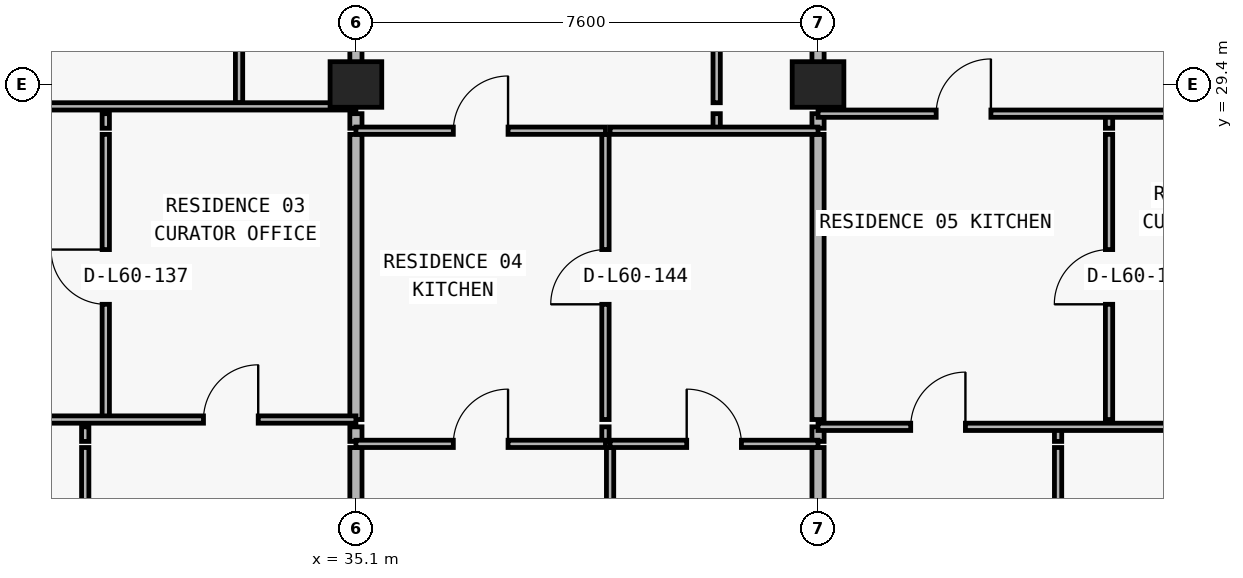
"""IFC4 building model, lengths in metres.
Left out: names, types, materials, properties, quantities, classifications, styles, units other than length and angle.
Written with IfcOpenShell. Run it as: python <this file> out.ifc"""

import sys

from ifc_helpers import new_model, si_unit, direction, frame, frame_2d, origin, origin_2d, place, context, subcontext, project, spatial, rectangle, extrude, element, fill, save


model = new_model("IFC4")
c1 = context("Model", 3, precision=1e-05, world=origin(), true_north=direction((0.0, 1.0)))
c2 = subcontext(c1, "Body", "Model", "MODEL_VIEW")
j1 = project(units=[si_unit("LENGTHUNIT", "METRE"), si_unit("PLANEANGLEUNIT", "RADIAN")], contexts=[c1])
p1 = place(None, origin())
s1 = spatial("IfcSite", under=j1, at=p1, CompositionType="ELEMENT")
p2 = place(p1, origin())
s2 = spatial("IfcBuilding", under=s1, at=p2, CompositionType="ELEMENT")
p3 = place(p2, frame((0.0, 0.0, 214.8)))
s3 = spatial("IfcBuildingStorey", under=s2, at=p3, CompositionType="ELEMENT", Elevation=214.8)
for number, where, z_axis, x_axis in (
    (1, (35.1, 29.4, 0.0), (0.0, 0.0, 1.0), (1.0, 0.0, 0.0)),
    (2, (42.7, 29.4, 0.0), (0.0, 0.0, 1.0), (1.0, 0.0, 0.0)),
):
    element("IfcColumn", number, at=place(p3, frame(where, z_axis=z_axis, x_axis=x_axis)), inside=s3, PredefinedType="COLUMN", context=c2, shape_type="SweptSolid", body=[
        extrude(rectangle(XDim=0.85, YDim=0.75, at=origin_2d()), origin(), (0.0, 0.0, 1.0), 3.05),
    ])
p4 = place(p3, frame((30.648, 11.24, 0.0), z_axis=(0.0, 0.0, 1.0), x_axis=(0.0, 1.0, 0.0)))
e3 = element("IfcWall", 3, at=p4, inside=s3, PredefinedType="PARTITIONING", context=c2, shape_type="SweptSolid", body=[
    extrude(rectangle(XDim=12.19, YDim=0.12, at=frame_2d((6.095, 0.0))), origin(), (0.0, 0.0, 1.0), 3.05),
])
p5 = place(p3, frame((30.648, 23.53, 0.0), z_axis=(0.0, 0.0, 1.0), x_axis=(0.0, 1.0, 0.0)))
e4 = element("IfcWall", 4, at=p5, inside=s3, PredefinedType="PARTITIONING", context=c2, shape_type="SweptSolid", body=[
    extrude(rectangle(XDim=0.24, YDim=0.12, at=frame_2d((0.12, 0.0))), origin(), (0.0, 0.0, 1.0), 3.05),
])
p6 = place(p3, frame((30.986, 23.89, 0.0), z_axis=(0.0, 0.0, 1.0), x_axis=(0.0, 1.0, 0.0)))
e5 = element("IfcWall", 5, at=p6, inside=s3, PredefinedType="PARTITIONING", context=c2, shape_type="SweptSolid", body=[
    extrude(rectangle(XDim=4.69, YDim=0.12, at=frame_2d((2.345, 0.0))), origin(), (0.0, 0.0, 1.0), 3.05),
])
p7 = place(p6, frame((1.895, 0.0, 0.0)))
e6 = element("IfcOpeningElement", 6, at=p7, cuts=e5, PredefinedType="OPENING", context=c2, shape_type="SweptSolid", body=[
    extrude(rectangle(XDim=0.9, YDim=2.15, at=frame_2d((0.45, 1.075))), frame((0.0, 0.07, 0.0), z_axis=(0.0, -1.0, 0.0), x_axis=(1.0, 0.0, 0.0)), (0.0, 0.0, 1.0), 0.14),
])
p8 = place(p3, frame((30.986, 28.68, 0.0), z_axis=(0.0, 0.0, 1.0), x_axis=(0.0, 1.0, 0.0)))
e7 = element("IfcWall", 7, at=p8, inside=s3, PredefinedType="PARTITIONING", context=c2, shape_type="SweptSolid", body=[
    extrude(rectangle(XDim=0.24, YDim=0.12, at=frame_2d((0.12, 0.0))), origin(), (0.0, 0.0, 1.0), 3.05),
])
p9 = place(p3, frame((33.178, 29.1, 0.0), z_axis=(0.0, 0.0, 1.0), x_axis=(0.0, 1.0, 0.0)))
e8 = element("IfcWall", 8, at=p9, inside=s3, PredefinedType="PARTITIONING", context=c2, shape_type="SweptSolid", body=[
    extrude(rectangle(XDim=5.3, YDim=0.12, at=frame_2d((2.65, 0.0))), origin(), (0.0, 0.0, 1.0), 3.05),
])
p10 = place(p9, frame((2.225, 0.0, 0.0)))
e9 = element("IfcOpeningElement", 9, at=p10, cuts=e8, PredefinedType="OPENING", context=c2, shape_type="SweptSolid", body=[
    extrude(rectangle(XDim=0.85, YDim=2.1, at=frame_2d((0.425, 1.05))), frame((0.0, 0.07, 0.0), z_axis=(0.0, -1.0, 0.0), x_axis=(1.0, 0.0, 0.0)), (0.0, 0.0, 1.0), 0.14),
])
p11 = place(p3, frame((35.1, 11.24, 0.0), z_axis=(0.0, 0.0, 1.0), x_axis=(0.0, 1.0, 0.0)))
e10 = element("IfcWall", 10, at=p11, inside=s3, PredefinedType="PARTITIONING", context=c2, shape_type="SweptSolid", body=[
    extrude(rectangle(XDim=12.19, YDim=0.2, at=frame_2d((6.095, 0.0))), origin(), (0.0, 0.0, 1.0), 2.263),
])
p12 = place(p3, frame((35.1, 23.53, 0.0), z_axis=(0.0, 0.0, 1.0), x_axis=(0.0, 1.0, 0.0)))
e11 = element("IfcWall", 11, at=p12, inside=s3, PredefinedType="PARTITIONING", context=c2, shape_type="SweptSolid", body=[
    extrude(rectangle(XDim=0.24, YDim=0.2, at=frame_2d((0.12, 0.0))), origin(), (0.0, 0.0, 1.0), 2.263),
])
p13 = place(p3, frame((35.1, 23.89, 0.0), z_axis=(0.0, 0.0, 1.0), x_axis=(0.0, 1.0, 0.0)))
e12 = element("IfcWall", 12, at=p13, inside=s3, PredefinedType="PARTITIONING", context=c2, shape_type="SweptSolid", body=[
    extrude(rectangle(XDim=4.69, YDim=0.2, at=frame_2d((2.345, 0.0))), origin(), (0.0, 0.0, 1.0), 2.263),
])
p14 = place(p3, frame((35.1, 28.68, 0.0), z_axis=(0.0, 0.0, 1.0), x_axis=(0.0, 1.0, 0.0)))
e13 = element("IfcWall", 13, at=p14, inside=s3, PredefinedType="PARTITIONING", context=c2, shape_type="SweptSolid", body=[
    extrude(rectangle(XDim=0.24, YDim=0.2, at=frame_2d((0.12, 0.0))), origin(), (0.0, 0.0, 1.0), 2.263),
])
p15 = place(p3, frame((35.1, 29.1, 0.0), z_axis=(0.0, 0.0, 1.0), x_axis=(0.0, 1.0, 0.0)))
e14 = element("IfcWall", 14, at=p15, inside=s3, PredefinedType="PARTITIONING", context=c2, shape_type="SweptSolid", body=[
    extrude(rectangle(XDim=5.3, YDim=0.2, at=frame_2d((2.65, 0.0))), origin(), (0.0, 0.0, 1.0), 2.263),
])
p16 = place(p3, frame((39.204, 23.53, 0.0), z_axis=(0.0, 0.0, 1.0), x_axis=(0.0, 1.0, 0.0)))
e15 = element("IfcWall", 15, at=p16, inside=s3, PredefinedType="PARTITIONING", context=c2, shape_type="SweptSolid", body=[
    extrude(rectangle(XDim=0.24, YDim=0.12, at=frame_2d((0.12, 0.0))), origin(), (0.0, 0.0, 1.0), 3.05),
])
p17 = place(p3, frame((39.204, 23.89, 0.0), z_axis=(0.0, 0.0, 1.0), x_axis=(0.0, 1.0, 0.0)))
e16 = element("IfcWall", 16, at=p17, inside=s3, PredefinedType="PARTITIONING", context=c2, shape_type="SweptSolid", body=[
    extrude(rectangle(XDim=4.69, YDim=0.12, at=frame_2d((2.345, 0.0))), origin(), (0.0, 0.0, 1.0), 3.05),
])
p18 = place(p17, frame((1.895, 0.0, 0.0)))
e17 = element("IfcOpeningElement", 17, at=p18, cuts=e16, PredefinedType="OPENING", context=c2, shape_type="SweptSolid", body=[
    extrude(rectangle(XDim=0.9, YDim=2.15, at=frame_2d((0.45, 1.075))), frame((0.0, 0.07, 0.0), z_axis=(0.0, -1.0, 0.0), x_axis=(1.0, 0.0, 0.0)), (0.0, 0.0, 1.0), 0.14),
])
p19 = place(p3, frame((39.28, 11.24, 0.0), z_axis=(0.0, 0.0, 1.0), x_axis=(0.0, 1.0, 0.0)))
e18 = element("IfcWall", 18, at=p19, inside=s3, PredefinedType="PARTITIONING", context=c2, shape_type="SweptSolid", body=[
    extrude(rectangle(XDim=12.19, YDim=0.12, at=frame_2d((6.095, 0.0))), origin(), (0.0, 0.0, 1.0), 3.05),
])
p20 = place(p3, frame((41.033, 28.68, 0.0), z_axis=(0.0, 0.0, 1.0), x_axis=(0.0, 1.0, 0.0)))
e19 = element("IfcWall", 19, at=p20, inside=s3, PredefinedType="PARTITIONING", context=c2, shape_type="SweptSolid", body=[
    extrude(rectangle(XDim=0.24, YDim=0.12, at=frame_2d((0.12, 0.0))), origin(), (0.0, 0.0, 1.0), 3.05),
])
p21 = place(p3, frame((41.033, 29.1, 0.0), z_axis=(0.0, 0.0, 1.0), x_axis=(0.0, 1.0, 0.0)))
e20 = element("IfcWall", 20, at=p21, inside=s3, PredefinedType="PARTITIONING", context=c2, shape_type="SweptSolid", body=[
    extrude(rectangle(XDim=5.3, YDim=0.12, at=frame_2d((2.65, 0.0))), origin(), (0.0, 0.0, 1.0), 3.05),
])
p22 = place(p21, frame((2.225, 0.0, 0.0)))
e21 = element("IfcOpeningElement", 21, at=p22, cuts=e20, PredefinedType="OPENING", context=c2, shape_type="SweptSolid", body=[
    extrude(rectangle(XDim=0.85, YDim=2.1, at=frame_2d((0.425, 1.05))), frame((0.0, 0.07, 0.0), z_axis=(0.0, -1.0, 0.0), x_axis=(1.0, 0.0, 0.0)), (0.0, 0.0, 1.0), 0.14),
])
p23 = place(p3, frame((42.7, 11.24, 0.0), z_axis=(0.0, 0.0, 1.0), x_axis=(0.0, 1.0, 0.0)))
e22 = element("IfcWall", 22, at=p23, inside=s3, PredefinedType="PARTITIONING", context=c2, shape_type="SweptSolid", body=[
    extrude(rectangle(XDim=12.19, YDim=0.2, at=frame_2d((6.095, 0.0))), origin(), (0.0, 0.0, 1.0), 2.263),
])
p24 = place(p3, frame((42.7, 23.53, 0.0), z_axis=(0.0, 0.0, 1.0), x_axis=(0.0, 1.0, 0.0)))
e23 = element("IfcWall", 23, at=p24, inside=s3, PredefinedType="PARTITIONING", context=c2, shape_type="SweptSolid", body=[
    extrude(rectangle(XDim=0.24, YDim=0.2, at=frame_2d((0.12, 0.0))), origin(), (0.0, 0.0, 1.0), 2.263),
])
p25 = place(p3, frame((42.7, 23.89, 0.0), z_axis=(0.0, 0.0, 1.0), x_axis=(0.0, 1.0, 0.0)))
e24 = element("IfcWall", 24, at=p25, inside=s3, PredefinedType="PARTITIONING", context=c2, shape_type="SweptSolid", body=[
    extrude(rectangle(XDim=4.69, YDim=0.2, at=frame_2d((2.345, 0.0))), origin(), (0.0, 0.0, 1.0), 2.263),
])
p26 = place(p3, frame((42.7, 28.68, 0.0), z_axis=(0.0, 0.0, 1.0), x_axis=(0.0, 1.0, 0.0)))
e25 = element("IfcWall", 25, at=p26, inside=s3, PredefinedType="PARTITIONING", context=c2, shape_type="SweptSolid", body=[
    extrude(rectangle(XDim=0.24, YDim=0.2, at=frame_2d((0.12, 0.0))), origin(), (0.0, 0.0, 1.0), 2.263),
])
p27 = place(p3, frame((42.7, 29.1, 0.0), z_axis=(0.0, 0.0, 1.0), x_axis=(0.0, 1.0, 0.0)))
e26 = element("IfcWall", 26, at=p27, inside=s3, PredefinedType="PARTITIONING", context=c2, shape_type="SweptSolid", body=[
    extrude(rectangle(XDim=5.3, YDim=0.2, at=frame_2d((2.65, 0.0))), origin(), (0.0, 0.0, 1.0), 2.263),
])
p28 = place(p3, frame((46.648, 11.24, 0.0), z_axis=(0.0, 0.0, 1.0), x_axis=(0.0, 1.0, 0.0)))
e27 = element("IfcWall", 27, at=p28, inside=s3, PredefinedType="PARTITIONING", context=c2, shape_type="SweptSolid", body=[
    extrude(rectangle(XDim=12.19, YDim=0.12, at=frame_2d((6.095, 0.0))), origin(), (0.0, 0.0, 1.0), 3.05),
])
p29 = place(p3, frame((46.648, 23.53, 0.0), z_axis=(0.0, 0.0, 1.0), x_axis=(0.0, 1.0, 0.0)))
e28 = element("IfcWall", 28, at=p29, inside=s3, PredefinedType="PARTITIONING", context=c2, shape_type="SweptSolid", body=[
    extrude(rectangle(XDim=0.24, YDim=0.12, at=frame_2d((0.12, 0.0))), origin(), (0.0, 0.0, 1.0), 3.05),
])
p30 = place(p3, frame((47.486, 23.89, 0.0), z_axis=(0.0, 0.0, 1.0), x_axis=(0.0, 1.0, 0.0)))
e29 = element("IfcWall", 29, at=p30, inside=s3, PredefinedType="PARTITIONING", context=c2, shape_type="SweptSolid", body=[
    extrude(rectangle(XDim=4.69, YDim=0.12, at=frame_2d((2.345, 0.0))), origin(), (0.0, 0.0, 1.0), 3.05),
])
p31 = place(p30, frame((1.895, 0.0, 0.0)))
e30 = element("IfcOpeningElement", 30, at=p31, cuts=e29, PredefinedType="OPENING", context=c2, shape_type="SweptSolid", body=[
    extrude(rectangle(XDim=0.9, YDim=2.15, at=frame_2d((0.45, 1.075))), frame((0.0, 0.07, 0.0), z_axis=(0.0, -1.0, 0.0), x_axis=(1.0, 0.0, 0.0)), (0.0, 0.0, 1.0), 0.14),
])
p32 = place(p3, frame((47.486, 28.68, 0.0), z_axis=(0.0, 0.0, 1.0), x_axis=(0.0, 1.0, 0.0)))
e31 = element("IfcWall", 31, at=p32, inside=s3, PredefinedType="PARTITIONING", context=c2, shape_type="SweptSolid", body=[
    extrude(rectangle(XDim=0.24, YDim=0.12, at=frame_2d((0.12, 0.0))), origin(), (0.0, 0.0, 1.0), 3.05),
])
p33 = place(p3, frame((35.1, 23.49, 0.0), z_axis=(0.0, 0.0, 1.0), x_axis=(1.0, 0.0, 0.0)))
e32 = element("IfcWall", 32, at=p33, inside=s3, PredefinedType="PARTITIONING", context=c2, shape_type="SweptSolid", body=[
    extrude(rectangle(XDim=4.104, YDim=0.12, at=frame_2d((2.052, 0.0))), origin(), (0.0, 0.0, 1.0), 3.05),
])
p34 = place(p33, frame((1.602, 0.0, 0.0)))
e33 = element("IfcOpeningElement", 33, at=p34, cuts=e32, PredefinedType="OPENING", context=c2, shape_type="SweptSolid", body=[
    extrude(rectangle(XDim=0.9, YDim=2.15, at=frame_2d((0.45, 1.075))), frame((0.0, 0.07, 0.0), z_axis=(0.0, -1.0, 0.0), x_axis=(1.0, 0.0, 0.0)), (0.0, 0.0, 1.0), 0.14),
])
p35 = place(p3, frame((39.28, 23.49, 0.0), z_axis=(0.0, 0.0, 1.0), x_axis=(1.0, 0.0, 0.0)))
e34 = element("IfcWall", 34, at=p35, inside=s3, PredefinedType="PARTITIONING", context=c2, shape_type="SweptSolid", body=[
    extrude(rectangle(XDim=3.42, YDim=0.12, at=frame_2d((1.71, 0.0))), origin(), (0.0, 0.0, 1.0), 3.05),
])
p36 = place(p35, frame((1.26, 0.0, 0.0)))
e35 = element("IfcOpeningElement", 35, at=p36, cuts=e34, PredefinedType="OPENING", context=c2, shape_type="SweptSolid", body=[
    extrude(rectangle(XDim=0.9, YDim=2.15, at=frame_2d((0.45, 1.075))), frame((0.0, 0.07, 0.0), z_axis=(0.0, -1.0, 0.0), x_axis=(1.0, 0.0, 0.0)), (0.0, 0.0, 1.0), 0.14),
])
p37 = place(p3, frame((42.7, 23.77, 0.0), z_axis=(0.0, 0.0, 1.0), x_axis=(1.0, 0.0, 0.0)))
e36 = element("IfcWall", 36, at=p37, inside=s3, PredefinedType="PARTITIONING", context=c2, shape_type="SweptSolid", body=[
    extrude(rectangle(XDim=8.18, YDim=0.12, at=frame_2d((4.09, 0.0))), origin(), (0.0, 0.0, 1.0), 3.05),
])
p38 = place(p37, frame((1.524, 0.0, 0.0)))
e37 = element("IfcOpeningElement", 37, at=p38, cuts=e36, PredefinedType="OPENING", context=c2, shape_type="SweptSolid", body=[
    extrude(rectangle(XDim=0.9, YDim=2.15, at=frame_2d((0.45, 1.075))), frame((0.0, 0.07, 0.0), z_axis=(0.0, -1.0, 0.0), x_axis=(1.0, 0.0, 0.0)), (0.0, 0.0, 1.0), 0.14),
])
p39 = place(p37, frame((6.033, 0.0, 0.0)))
e38 = element("IfcOpeningElement", 38, at=p39, cuts=e36, PredefinedType="OPENING", context=c2, shape_type="SweptSolid", body=[
    extrude(rectangle(XDim=0.9, YDim=2.15, at=frame_2d((0.45, 1.075))), frame((0.0, 0.07, 0.0), z_axis=(0.0, -1.0, 0.0), x_axis=(1.0, 0.0, 0.0)), (0.0, 0.0, 1.0), 0.14),
])
p40 = place(p3, frame((26.92, 23.89, 0.0), z_axis=(0.0, 0.0, 1.0), x_axis=(1.0, 0.0, 0.0)))
e39 = element("IfcWall", 39, at=p40, inside=s3, PredefinedType="PARTITIONING", context=c2, shape_type="SweptSolid", body=[
    extrude(rectangle(XDim=8.18, YDim=0.12, at=frame_2d((4.09, 0.0))), origin(), (0.0, 0.0, 1.0), 3.05),
])
p41 = place(p40, frame((1.414, 0.0, 0.0)))
e40 = element("IfcOpeningElement", 40, at=p41, cuts=e39, PredefinedType="OPENING", context=c2, shape_type="SweptSolid", body=[
    extrude(rectangle(XDim=0.9, YDim=2.15, at=frame_2d((0.45, 1.075))), frame((0.0, 0.07, 0.0), z_axis=(0.0, -1.0, 0.0), x_axis=(1.0, 0.0, 0.0)), (0.0, 0.0, 1.0), 0.14),
])
p42 = place(p40, frame((5.673, 0.0, 0.0)))
e41 = element("IfcOpeningElement", 41, at=p42, cuts=e39, PredefinedType="OPENING", context=c2, shape_type="SweptSolid", body=[
    extrude(rectangle(XDim=0.9, YDim=2.15, at=frame_2d((0.45, 1.075))), frame((0.0, 0.07, 0.0), z_axis=(0.0, -1.0, 0.0), x_axis=(1.0, 0.0, 0.0)), (0.0, 0.0, 1.0), 0.14),
])
p43 = place(p3, frame((35.1, 28.64, 0.0), z_axis=(0.0, 0.0, 1.0), x_axis=(1.0, 0.0, 0.0)))
e42 = element("IfcWall", 42, at=p43, inside=s3, PredefinedType="PARTITIONING", context=c2, shape_type="SweptSolid", body=[
    extrude(rectangle(XDim=4.104, YDim=0.12, at=frame_2d((2.052, 0.0))), origin(), (0.0, 0.0, 1.0), 3.05),
])
p44 = place(p43, frame((1.602, 0.0, 0.0)))
e43 = element("IfcOpeningElement", 43, at=p44, cuts=e42, PredefinedType="OPENING", context=c2, shape_type="SweptSolid", body=[
    extrude(rectangle(XDim=0.9, YDim=2.15, at=frame_2d((0.45, 1.075))), frame((0.0, 0.07, 0.0), z_axis=(0.0, -1.0, 0.0), x_axis=(1.0, 0.0, 0.0)), (0.0, 0.0, 1.0), 0.14),
])
p45 = place(p3, frame((39.28, 28.64, 0.0), z_axis=(0.0, 0.0, 1.0), x_axis=(1.0, 0.0, 0.0)))
e44 = element("IfcWall", 44, at=p45, inside=s3, PredefinedType="PARTITIONING", context=c2, shape_type="SweptSolid", body=[
    extrude(rectangle(XDim=3.42, YDim=0.12, at=frame_2d((1.71, 0.0))), origin(), (0.0, 0.0, 1.0), 3.05),
])
p46 = place(p3, frame((42.7, 28.92, 0.0), z_axis=(0.0, 0.0, 1.0), x_axis=(1.0, 0.0, 0.0)))
e45 = element("IfcWall", 45, at=p46, inside=s3, PredefinedType="PARTITIONING", context=c2, shape_type="SweptSolid", body=[
    extrude(rectangle(XDim=8.18, YDim=0.12, at=frame_2d((4.09, 0.0))), origin(), (0.0, 0.0, 1.0), 3.05),
])
p47 = place(p46, frame((1.943, 0.0, 0.0)))
e46 = element("IfcOpeningElement", 46, at=p47, cuts=e45, PredefinedType="OPENING", context=c2, shape_type="SweptSolid", body=[
    extrude(rectangle(XDim=0.9, YDim=2.15, at=frame_2d((0.45, 1.075))), frame((0.0, 0.07, 0.0), z_axis=(0.0, -1.0, 0.0), x_axis=(1.0, 0.0, 0.0)), (0.0, 0.0, 1.0), 0.14),
])
p48 = place(p3, frame((26.92, 29.04, 0.0), z_axis=(0.0, 0.0, 1.0), x_axis=(1.0, 0.0, 0.0)))
e47 = element("IfcWall", 47, at=p48, inside=s3, PredefinedType="PARTITIONING", context=c2, shape_type="SweptSolid", body=[
    extrude(rectangle(XDim=8.18, YDim=0.12, at=frame_2d((4.09, 0.0))), origin(), (0.0, 0.0, 1.0), 3.05),
])
p49 = place(p48, frame((1.583, 0.0, 0.0)))
e48 = element("IfcOpeningElement", 48, at=p49, cuts=e47, PredefinedType="OPENING", context=c2, shape_type="SweptSolid", body=[
    extrude(rectangle(XDim=0.9, YDim=2.15, at=frame_2d((0.45, 1.075))), frame((0.0, 0.07, 0.0), z_axis=(0.0, -1.0, 0.0), x_axis=(1.0, 0.0, 0.0)), (0.0, 0.0, 1.0), 0.14),
])
p50 = place(p7, origin())
e49 = element("IfcDoor", 49, at=p50, inside=s3, OperationType="SINGLE_SWING_RIGHT", PredefinedType="DOOR", context=c2, shape_type="SweptSolid", body=[
    extrude(rectangle(XDim=0.9, YDim=2.15, at=frame_2d((0.45, 1.075))), frame((0.0, 0.025, 0.0), z_axis=(0.0, -1.0, 0.0), x_axis=(1.0, 0.0, 0.0)), (0.0, 0.0, 1.0), 0.05),
])
fill(e6, e49)
p51 = place(p42, origin())
e50 = element("IfcDoor", 50, at=p51, inside=s3, OperationType="SINGLE_SWING_RIGHT", PredefinedType="DOOR", context=c2, shape_type="SweptSolid", body=[
    extrude(rectangle(XDim=0.9, YDim=2.15, at=frame_2d((0.45, 1.075))), frame((0.0, 0.025, 0.0), z_axis=(0.0, -1.0, 0.0), x_axis=(1.0, 0.0, 0.0)), (0.0, 0.0, 1.0), 0.05),
])
fill(e41, e50)
p52 = place(p44, origin())
e51 = element("IfcDoor", 51, at=p52, inside=s3, OperationType="SINGLE_SWING_RIGHT", PredefinedType="DOOR", context=c2, shape_type="SweptSolid", body=[
    extrude(rectangle(XDim=0.9, YDim=2.15, at=frame_2d((0.45, 1.075))), frame((0.0, 0.025, 0.0), z_axis=(0.0, -1.0, 0.0), x_axis=(1.0, 0.0, 0.0)), (0.0, 0.0, 1.0), 0.05),
])
fill(e43, e51)
p53 = place(p18, origin())
e52 = element("IfcDoor", 52, at=p53, inside=s3, OperationType="SINGLE_SWING_LEFT", PredefinedType="DOOR", context=c2, shape_type="SweptSolid", body=[
    extrude(rectangle(XDim=0.9, YDim=2.15, at=frame_2d((0.45, 1.075))), frame((0.0, 0.025, 0.0), z_axis=(0.0, -1.0, 0.0), x_axis=(1.0, 0.0, 0.0)), (0.0, 0.0, 1.0), 0.05),
])
fill(e17, e52)
p54 = place(p34, origin())
e53 = element("IfcDoor", 53, at=p54, inside=s3, OperationType="SINGLE_SWING_RIGHT", PredefinedType="DOOR", context=c2, shape_type="SweptSolid", body=[
    extrude(rectangle(XDim=0.9, YDim=2.15, at=frame_2d((0.45, 1.075))), frame((0.0, 0.025, 0.0), z_axis=(0.0, -1.0, 0.0), x_axis=(1.0, 0.0, 0.0)), (0.0, 0.0, 1.0), 0.05),
])
fill(e33, e53)
p55 = place(p36, origin())
e54 = element("IfcDoor", 54, at=p55, inside=s3, OperationType="SINGLE_SWING_LEFT", PredefinedType="DOOR", context=c2, shape_type="SweptSolid", body=[
    extrude(rectangle(XDim=0.9, YDim=2.15, at=frame_2d((0.45, 1.075))), frame((0.0, 0.025, 0.0), z_axis=(0.0, -1.0, 0.0), x_axis=(1.0, 0.0, 0.0)), (0.0, 0.0, 1.0), 0.05),
])
fill(e35, e54)
p56 = place(p47, origin())
e55 = element("IfcDoor", 55, at=p56, inside=s3, OperationType="SINGLE_SWING_RIGHT", PredefinedType="DOOR", context=c2, shape_type="SweptSolid", body=[
    extrude(rectangle(XDim=0.9, YDim=2.15, at=frame_2d((0.45, 1.075))), frame((0.0, 0.025, 0.0), z_axis=(0.0, -1.0, 0.0), x_axis=(1.0, 0.0, 0.0)), (0.0, 0.0, 1.0), 0.05),
])
fill(e46, e55)
p57 = place(p31, origin())
e56 = element("IfcDoor", 56, at=p57, inside=s3, OperationType="SINGLE_SWING_LEFT", PredefinedType="DOOR", context=c2, shape_type="SweptSolid", body=[
    extrude(rectangle(XDim=0.9, YDim=2.15, at=frame_2d((0.45, 1.075))), frame((0.0, 0.025, 0.0), z_axis=(0.0, -1.0, 0.0), x_axis=(1.0, 0.0, 0.0)), (0.0, 0.0, 1.0), 0.05),
])
fill(e30, e56)
p58 = place(p38, origin())
e57 = element("IfcDoor", 57, at=p58, inside=s3, OperationType="SINGLE_SWING_RIGHT", PredefinedType="DOOR", context=c2, shape_type="SweptSolid", body=[
    extrude(rectangle(XDim=0.9, YDim=2.15, at=frame_2d((0.45, 1.075))), frame((0.0, 0.025, 0.0), z_axis=(0.0, -1.0, 0.0), x_axis=(1.0, 0.0, 0.0)), (0.0, 0.0, 1.0), 0.05),
])
fill(e37, e57)
save(model, sys.argv[1])
